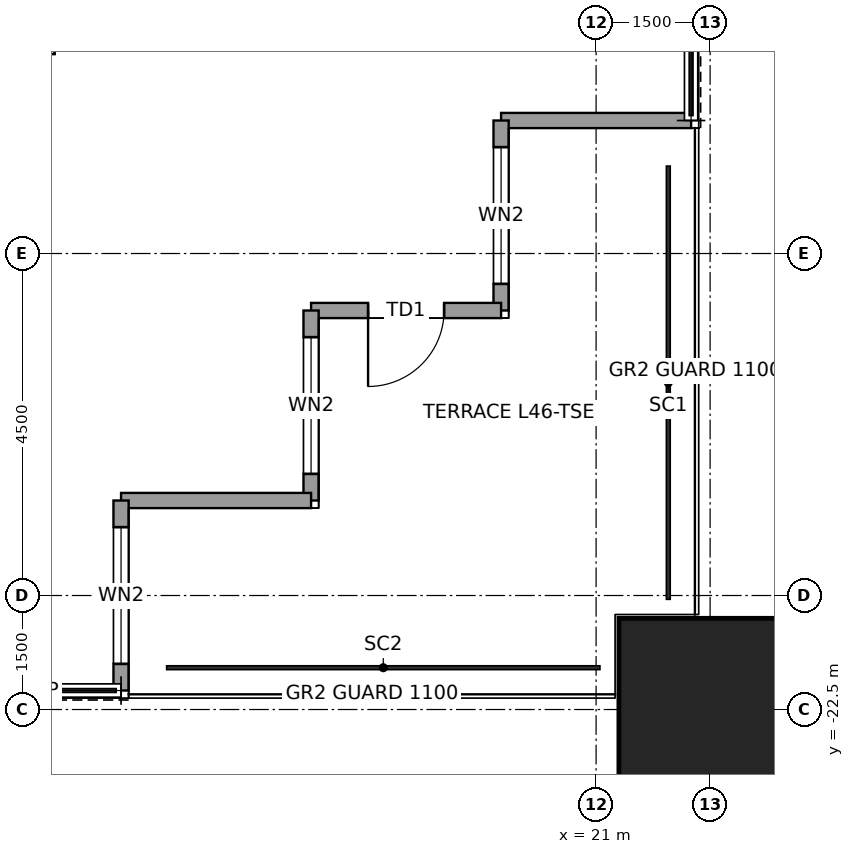
"""IFC4 building model, lengths in metres.
Left out: names, types, materials, properties, quantities, classifications, styles, units other than length and angle.
Written with IfcOpenShell. Run it as: python <this file> out.ifc"""

import sys

from ifc_helpers import new_model, si_unit, direction, frame, frame_2d, origin, origin_2d, place, context, subcontext, project, spatial, rectangle, hollow_rectangle, extrude, element, fill, save


model = new_model("IFC4")
c1 = context("Model", 3, precision=1e-05, world=origin(), true_north=direction((0.0, 1.0)))
c2 = subcontext(c1, "Body", "Model", "MODEL_VIEW")
j1 = project(units=[si_unit("LENGTHUNIT", "METRE"), si_unit("PLANEANGLEUNIT", "RADIAN")], contexts=[c1])
p1 = place(None, origin())
s1 = spatial("IfcSite", under=j1, at=p1, CompositionType="ELEMENT")
p2 = place(p1, origin())
s2 = spatial("IfcBuilding", under=s1, at=p2, CompositionType="ELEMENT")
p3 = place(p2, frame((0.0, 0.0, 217.9)))
s3 = spatial("IfcBuildingStorey", under=s2, at=p3, CompositionType="ELEMENT", Elevation=217.9)
p4 = place(p3, frame((22.5, -22.5, 0.0), z_axis=(0.0, 0.0, 1.0), x_axis=(1.0, 0.0, 0.0)))
e1 = element("IfcColumn", 1, at=p4, inside=s3, PredefinedType="COLUMN", context=c2, shape_type="SweptSolid", body=[
    extrude(hollow_rectangle(XDim=2.4, YDim=2.4, WallThickness=0.12, at=origin_2d()), origin(), (0.0, 0.0, 1.0), 4.0),
])
p5 = place(p3, frame((22.25, -14.75, 0.0), z_axis=(0.0, 0.0, 1.0), x_axis=(-1.0, 0.0, 0.0)))
e2 = element("IfcWall", 2, at=p5, inside=s3, PredefinedType="SOLIDWALL", context=c2, shape_type="SweptSolid", body=[
    extrude(rectangle(XDim=2.5, YDim=0.2, at=frame_2d((1.25, 0.0))), origin(), (0.0, 0.0, 1.0), 3.85),
])
p6 = place(p3, frame((19.75, -14.75, 0.0), z_axis=(0.0, 0.0, 1.0), x_axis=(0.0, -1.0, 0.0)))
e3 = element("IfcWall", 3, at=p6, inside=s3, PredefinedType="SOLIDWALL", context=c2, shape_type="SweptSolid", body=[
    extrude(rectangle(XDim=2.5, YDim=0.2, at=frame_2d((1.25, 0.0))), origin(), (0.0, 0.0, 1.0), 3.85),
])
p7 = place(p6, frame((0.35, 0.0, 0.3)))
e4 = element("IfcOpeningElement", 4, at=p7, cuts=e3, PredefinedType="OPENING", context=c2, shape_type="SweptSolid", body=[
    extrude(rectangle(XDim=1.8, YDim=2.4, at=frame_2d((0.9, 1.2))), frame((0.0, 0.11, 0.0), z_axis=(0.0, -1.0, 0.0), x_axis=(1.0, 0.0, 0.0)), (0.0, 0.0, 1.0), 0.22),
])
p8 = place(p3, frame((19.75, -17.25, 0.0), z_axis=(0.0, 0.0, 1.0), x_axis=(-1.0, 0.0, 0.0)))
e5 = element("IfcWall", 5, at=p8, inside=s3, PredefinedType="SOLIDWALL", context=c2, shape_type="SweptSolid", body=[
    extrude(rectangle(XDim=2.5, YDim=0.2, at=frame_2d((1.25, 0.0))), origin(), (0.0, 0.0, 1.0), 3.85),
])
p9 = place(p8, frame((0.75, 0.0, 0.0)))
e6 = element("IfcOpeningElement", 6, at=p9, cuts=e5, PredefinedType="OPENING", context=c2, shape_type="SweptSolid", body=[
    extrude(rectangle(XDim=1.0, YDim=2.4, at=frame_2d((0.5, 1.2))), frame((0.0, 0.11, 0.0), z_axis=(0.0, -1.0, 0.0), x_axis=(1.0, 0.0, 0.0)), (0.0, 0.0, 1.0), 0.22),
])
p10 = place(p3, frame((17.25, -17.25, 0.0), z_axis=(0.0, 0.0, 1.0), x_axis=(0.0, -1.0, 0.0)))
e7 = element("IfcWall", 7, at=p10, inside=s3, PredefinedType="SOLIDWALL", context=c2, shape_type="SweptSolid", body=[
    extrude(rectangle(XDim=2.5, YDim=0.2, at=frame_2d((1.25, 0.0))), origin(), (0.0, 0.0, 1.0), 3.85),
])
p11 = place(p10, frame((0.35, 0.0, 0.3)))
e8 = element("IfcOpeningElement", 8, at=p11, cuts=e7, PredefinedType="OPENING", context=c2, shape_type="SweptSolid", body=[
    extrude(rectangle(XDim=1.8, YDim=2.4, at=frame_2d((0.9, 1.2))), frame((0.0, 0.11, 0.0), z_axis=(0.0, -1.0, 0.0), x_axis=(1.0, 0.0, 0.0)), (0.0, 0.0, 1.0), 0.22),
])
p12 = place(p3, frame((17.25, -19.75, 0.0), z_axis=(0.0, 0.0, 1.0), x_axis=(-1.0, 0.0, 0.0)))
e9 = element("IfcWall", 9, at=p12, inside=s3, PredefinedType="SOLIDWALL", context=c2, shape_type="SweptSolid", body=[
    extrude(rectangle(XDim=2.5, YDim=0.2, at=frame_2d((1.25, 0.0))), origin(), (0.0, 0.0, 1.0), 3.85),
])
p13 = place(p3, frame((14.75, -19.75, 0.0), z_axis=(0.0, 0.0, 1.0), x_axis=(0.0, -1.0, 0.0)))
e10 = element("IfcWall", 10, at=p13, inside=s3, PredefinedType="SOLIDWALL", context=c2, shape_type="SweptSolid", body=[
    extrude(rectangle(XDim=2.5, YDim=0.2, at=frame_2d((1.25, 0.0))), origin(), (0.0, 0.0, 1.0), 3.85),
])
p14 = place(p13, frame((0.35, 0.0, 0.3)))
e11 = element("IfcOpeningElement", 11, at=p14, cuts=e10, PredefinedType="OPENING", context=c2, shape_type="SweptSolid", body=[
    extrude(rectangle(XDim=1.8, YDim=2.4, at=frame_2d((0.9, 1.2))), frame((0.0, 0.11, 0.0), z_axis=(0.0, -1.0, 0.0), x_axis=(1.0, 0.0, 0.0)), (0.0, 0.0, 1.0), 0.22),
])
p15 = place(p3, frame((-0.075, -13.8, 0.0), z_axis=(0.0, 0.0, 1.0), x_axis=(1.0, 0.0, 0.0)))
e12 = element("IfcWall", 12, at=p15, inside=s3, PredefinedType="PARTITIONING", context=c2, shape_type="SweptSolid", body=[
    extrude(rectangle(XDim=13.95, YDim=0.15, at=frame_2d((6.975, 0.0))), origin(), (0.0, 0.0, 1.0), 3.85),
])
p16 = place(p15, frame((5.475, 0.0, 0.0)))
e13 = element("IfcOpeningElement", 13, at=p16, cuts=e12, PredefinedType="OPENING", context=c2, shape_type="SweptSolid", body=[
    extrude(rectangle(XDim=1.0, YDim=2.4, at=frame_2d((0.5, 1.2))), frame((0.0, 0.085, 0.0), z_axis=(0.0, -1.0, 0.0), x_axis=(1.0, 0.0, 0.0)), (0.0, 0.0, 1.0), 0.17),
])
p17 = place(p3, frame((13.8, -13.875, 0.0), z_axis=(0.0, 0.0, 1.0), x_axis=(0.0, 1.0, 0.0)))
e14 = element("IfcWall", 14, at=p17, inside=s3, PredefinedType="PARTITIONING", context=c2, shape_type="SweptSolid", body=[
    extrude(rectangle(XDim=13.95, YDim=0.15, at=frame_2d((6.975, 0.0))), origin(), (0.0, 0.0, 1.0), 3.85),
])
p18 = place(p7, origin())
e15 = element("IfcWindow", 15, at=p18, inside=s3, PartitioningType="SINGLE_PANEL", PredefinedType="WINDOW", context=c2, shape_type="SweptSolid", body=[
    extrude(rectangle(XDim=1.8, YDim=2.4, at=frame_2d((0.9, 1.2))), frame((0.0, 0.03, 0.0), z_axis=(0.0, -1.0, 0.0), x_axis=(1.0, 0.0, 0.0)), (0.0, 0.0, 1.0), 0.06),
])
fill(e4, e15)
p19 = place(p9, origin())
e16 = element("IfcDoor", 16, at=p19, inside=s3, OperationType="SINGLE_SWING_RIGHT", PredefinedType="DOOR", context=c2, shape_type="SweptSolid", body=[
    extrude(rectangle(XDim=1.0, YDim=2.4, at=frame_2d((0.5, 1.2))), frame((0.0, 0.025, 0.0), z_axis=(0.0, -1.0, 0.0), x_axis=(1.0, 0.0, 0.0)), (0.0, 0.0, 1.0), 0.05),
])
fill(e6, e16)
p20 = place(p11, origin())
e17 = element("IfcWindow", 17, at=p20, inside=s3, PartitioningType="SINGLE_PANEL", PredefinedType="WINDOW", context=c2, shape_type="SweptSolid", body=[
    extrude(rectangle(XDim=1.8, YDim=2.4, at=frame_2d((0.9, 1.2))), frame((0.0, 0.03, 0.0), z_axis=(0.0, -1.0, 0.0), x_axis=(1.0, 0.0, 0.0)), (0.0, 0.0, 1.0), 0.06),
])
fill(e8, e17)
p21 = place(p14, origin())
e18 = element("IfcWindow", 18, at=p21, inside=s3, PartitioningType="SINGLE_PANEL", PredefinedType="WINDOW", context=c2, shape_type="SweptSolid", body=[
    extrude(rectangle(XDim=1.8, YDim=2.4, at=frame_2d((0.9, 1.2))), frame((0.0, 0.03, 0.0), z_axis=(0.0, -1.0, 0.0), x_axis=(1.0, 0.0, 0.0)), (0.0, 0.0, 1.0), 0.06),
])
fill(e11, e18)
save(model, sys.argv[1])
